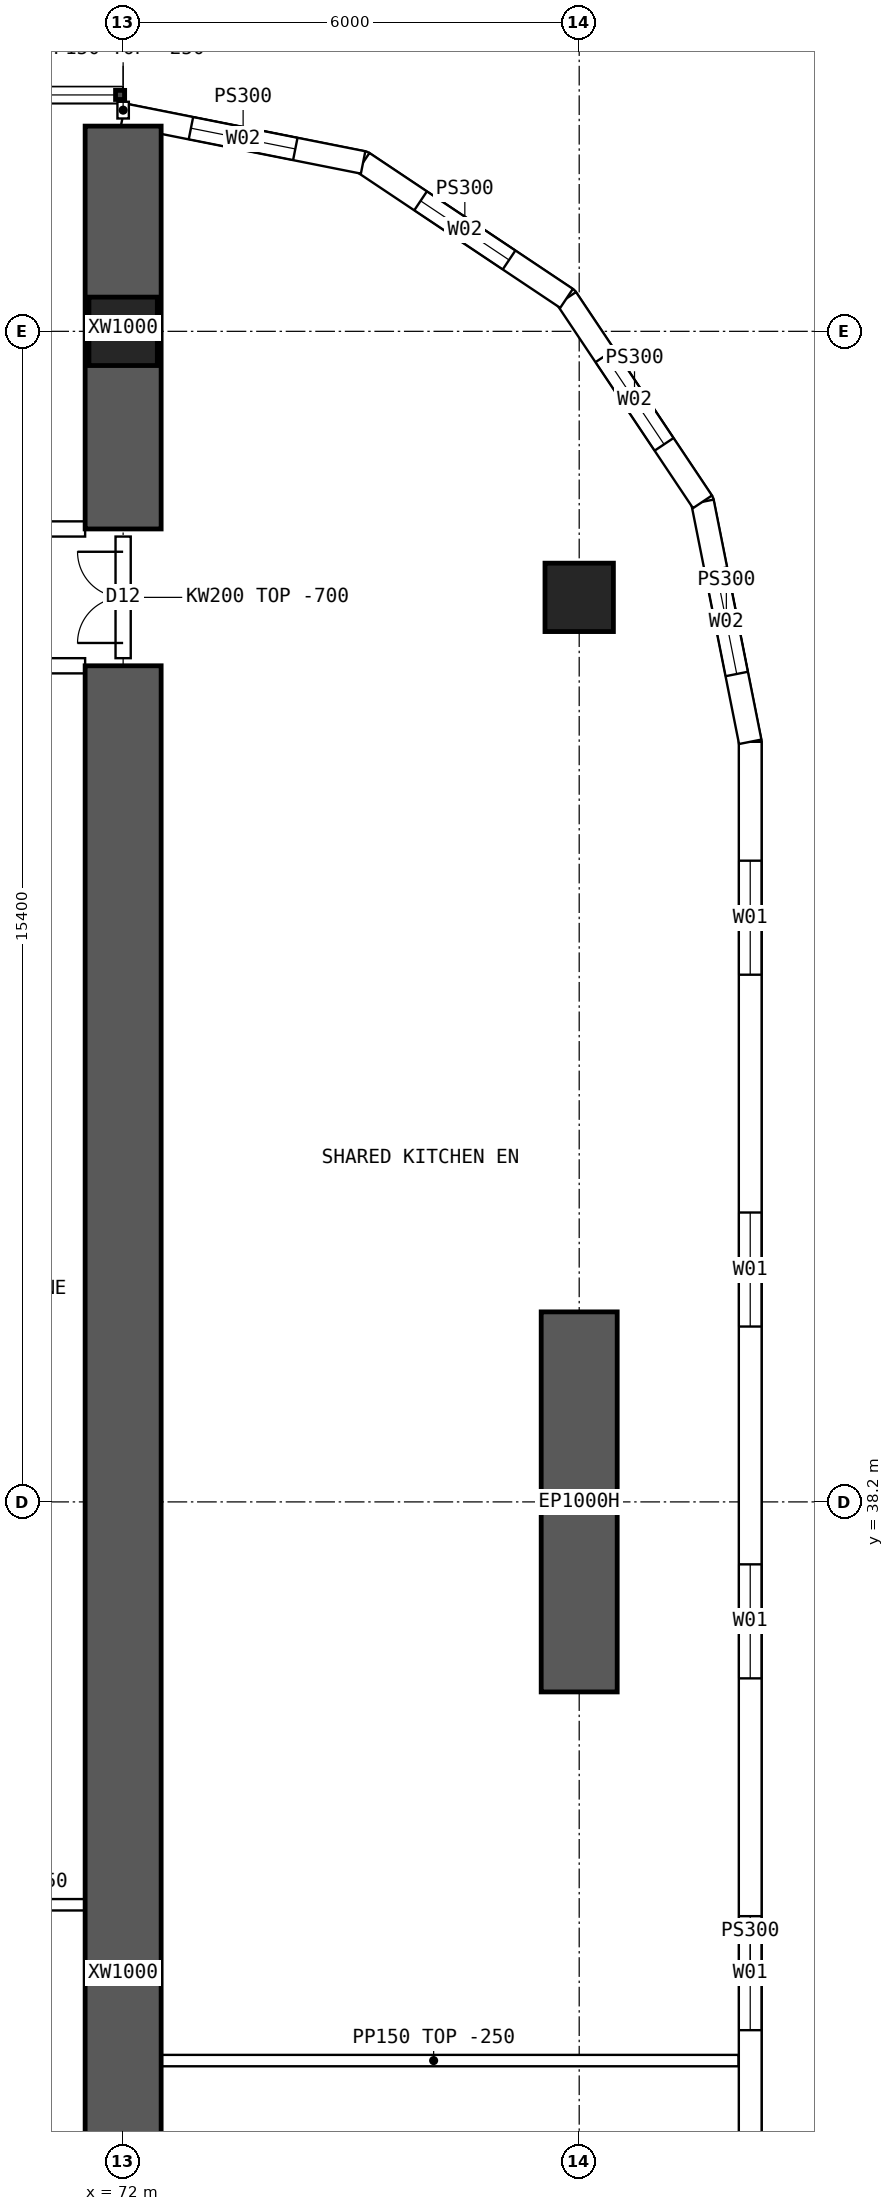
"""IFC4 building model, lengths in metres.
Left out: names, types, materials, properties, quantities, classifications, styles, units other than length and angle.
Written with IfcOpenShell. Run it as: python <this file> out.ifc"""

import sys

from ifc_helpers import new_model, si_unit, direction, frame, frame_2d, origin, origin_2d, place, context, subcontext, project, spatial, polyline, rectangle, hollow_rectangle, outline, extrude, element, fill, save


model = new_model("IFC4")
c1 = context("Model", 3, precision=1e-05, world=origin(), true_north=direction((0.0, 1.0)))
c2 = subcontext(c1, "Body", "Model", "MODEL_VIEW")
j1 = project(units=[si_unit("LENGTHUNIT", "METRE"), si_unit("PLANEANGLEUNIT", "RADIAN")], contexts=[c1])
p1 = place(None, origin())
s1 = spatial("IfcSite", under=j1, at=p1, CompositionType="ELEMENT")
p2 = place(p1, origin())
s2 = spatial("IfcBuilding", under=s1, at=p2, CompositionType="ELEMENT")
p3 = place(p2, frame((0.0, 0.0, 57.7)))
s3 = spatial("IfcBuildingStorey", under=s2, at=p3, CompositionType="ELEMENT", Elevation=57.7)
for number, where, z_axis, x_axis in (
    (1, (72.0, 53.6, 0.0), (0.0, 0.0, 1.0), (1.0, 0.0, 0.0)),
    (2, (78.0, 50.1, 0.0), (0.0, 0.0, 1.0), (1.0, 0.0, 0.0)),
):
    element("IfcColumn", number, at=place(p3, frame(where, z_axis=z_axis, x_axis=x_axis)), inside=s3, PredefinedType="COLUMN", context=c2, shape_type="SweptSolid", body=[
        extrude(hollow_rectangle(XDim=0.9, YDim=0.9, WallThickness=0.09, at=origin_2d()), origin(), (0.0, 0.0, 1.0), 3.75),
    ])
p4 = place(p3, frame((78.0, 35.7, 0.0), z_axis=(0.0, 0.0, 1.0), x_axis=(0.0, 1.0, 0.0)))
e3 = element("IfcWall", 3, at=p4, inside=s3, PredefinedType="SHEAR", context=c2, shape_type="SweptSolid", body=[
    extrude(rectangle(XDim=5.0, YDim=1.0, at=frame_2d((2.5, 0.0))), origin(), (0.0, 0.0, 1.0), 3.75),
])
p5 = place(p3, frame((72.0, 51.0, 0.0), z_axis=(0.0, 0.0, 1.0), x_axis=(0.0, 1.0, 0.0)))
e4 = element("IfcWall", 4, at=p5, inside=s3, PredefinedType="SHEAR", context=c2, shape_type="SweptSolid", body=[
    extrude(rectangle(XDim=5.3, YDim=1.0, at=frame_2d((2.65, 0.0))), origin(), (0.0, 0.0, 1.0), 3.75),
])
p6 = place(p3, frame((72.0, 14.8, 0.0), z_axis=(0.0, 0.0, 1.0), x_axis=(0.0, 1.0, 0.0)))
e5 = element("IfcWall", 5, at=p6, inside=s3, PredefinedType="SHEAR", context=c2, shape_type="SweptSolid", body=[
    extrude(rectangle(XDim=34.4, YDim=1.0, at=frame_2d((17.2, 0.0))), origin(), (0.0, 0.0, 1.0), 3.75),
])
p7 = place(p3, frame((80.25, 15.8, 0.0), z_axis=(0.0, 0.0, 1.0), x_axis=(0.0, 1.0, 0.0)))
e6 = element("IfcWall", 6, at=p7, inside=s3, PredefinedType="SOLIDWALL", context=c2, shape_type="SweptSolid", body=[
    extrude(outline(polyline([(-0.015, -0.15), (32.415, -0.15), (32.385, 0.15), (0.015, 0.15), (-0.015, -0.15)])), origin(), (0.0, 0.0, 1.0), 3.5),
])
p8 = place(p7, frame((1.564, 0.0, 0.9)))
e7 = element("IfcOpeningElement", 7, at=p8, cuts=e6, PredefinedType="OPENING", context=c2, shape_type="SweptSolid", body=[
    extrude(rectangle(XDim=1.5, YDim=2.0, at=frame_2d((0.75, 1.0))), frame((0.0, 0.16, 0.0), z_axis=(0.0, -1.0, 0.0), x_axis=(1.0, 0.0, 0.0)), (0.0, 0.0, 1.0), 0.32),
])
p9 = place(p7, frame((6.193, 0.0, 0.9)))
e8 = element("IfcOpeningElement", 8, at=p9, cuts=e6, PredefinedType="OPENING", context=c2, shape_type="SweptSolid", body=[
    extrude(rectangle(XDim=1.5, YDim=2.0, at=frame_2d((0.75, 1.0))), frame((0.0, 0.16, 0.0), z_axis=(0.0, -1.0, 0.0), x_axis=(1.0, 0.0, 0.0)), (0.0, 0.0, 1.0), 0.32),
])
p10 = place(p7, frame((10.822, 0.0, 0.9)))
e9 = element("IfcOpeningElement", 9, at=p10, cuts=e6, PredefinedType="OPENING", context=c2, shape_type="SweptSolid", body=[
    extrude(rectangle(XDim=1.5, YDim=2.0, at=frame_2d((0.75, 1.0))), frame((0.0, 0.16, 0.0), z_axis=(0.0, -1.0, 0.0), x_axis=(1.0, 0.0, 0.0)), (0.0, 0.0, 1.0), 0.32),
])
p11 = place(p7, frame((15.45, 0.0, 0.9)))
e10 = element("IfcOpeningElement", 10, at=p11, cuts=e6, PredefinedType="OPENING", context=c2, shape_type="SweptSolid", body=[
    extrude(rectangle(XDim=1.5, YDim=2.0, at=frame_2d((0.75, 1.0))), frame((0.0, 0.16, 0.0), z_axis=(0.0, -1.0, 0.0), x_axis=(1.0, 0.0, 0.0)), (0.0, 0.0, 1.0), 0.32),
])
p12 = place(p7, frame((20.079, 0.0, 0.9)))
e11 = element("IfcOpeningElement", 11, at=p12, cuts=e6, PredefinedType="OPENING", context=c2, shape_type="SweptSolid", body=[
    extrude(rectangle(XDim=1.5, YDim=2.0, at=frame_2d((0.75, 1.0))), frame((0.0, 0.16, 0.0), z_axis=(0.0, -1.0, 0.0), x_axis=(1.0, 0.0, 0.0)), (0.0, 0.0, 1.0), 0.32),
])
p13 = place(p7, frame((24.707, 0.0, 0.9)))
e12 = element("IfcOpeningElement", 12, at=p13, cuts=e6, PredefinedType="OPENING", context=c2, shape_type="SweptSolid", body=[
    extrude(rectangle(XDim=1.5, YDim=2.0, at=frame_2d((0.75, 1.0))), frame((0.0, 0.16, 0.0), z_axis=(0.0, -1.0, 0.0), x_axis=(1.0, 0.0, 0.0)), (0.0, 0.0, 1.0), 0.32),
])
p14 = place(p7, frame((29.336, 0.0, 0.9)))
e13 = element("IfcOpeningElement", 13, at=p14, cuts=e6, PredefinedType="OPENING", context=c2, shape_type="SweptSolid", body=[
    extrude(rectangle(XDim=1.5, YDim=2.0, at=frame_2d((0.75, 1.0))), frame((0.0, 0.16, 0.0), z_axis=(0.0, -1.0, 0.0), x_axis=(1.0, 0.0, 0.0)), (0.0, 0.0, 1.0), 0.32),
])
p15 = place(p3, frame((80.25, 48.2, 0.0), z_axis=(0.0, 0.0, 1.0), x_axis=(-0.195065901187, 0.980790137692, 0.0)))
e14 = element("IfcWall", 14, at=p15, inside=s3, PredefinedType="SOLIDWALL", context=c2, shape_type="SweptSolid", body=[
    extrude(outline(polyline([(-0.015, -0.15), (3.249, -0.15), (3.189, 0.15), (0.015, 0.15), (-0.015, -0.15)])), origin(), (0.0, 0.0, 1.0), 3.5),
])
p16 = place(p15, frame((0.909, 0.0, 0.9)))
e15 = element("IfcOpeningElement", 15, at=p16, cuts=e14, PredefinedType="OPENING", context=c2, shape_type="SweptSolid", body=[
    extrude(rectangle(XDim=1.4, YDim=1.8, at=frame_2d((0.7, 0.9))), frame((0.0, 0.16, 0.0), z_axis=(0.0, -1.0, 0.0), x_axis=(1.0, 0.0, 0.0)), (0.0, 0.0, 1.0), 0.32),
])
p17 = place(p3, frame((79.622, 51.357, 0.0), z_axis=(0.0, 0.0, 1.0), x_axis=(-0.555609954424, 0.831443069936, 0.0)))
e16 = element("IfcWall", 16, at=p17, inside=s3, PredefinedType="SOLIDWALL", context=c2, shape_type="SweptSolid", body=[
    extrude(outline(polyline([(-0.03, -0.15), (3.249, -0.15), (3.189, 0.15), (0.03, 0.15), (-0.03, -0.15)])), origin(), (0.0, 0.0, 1.0), 3.5),
])
p18 = place(p17, frame((0.909, 0.0, 0.9)))
e17 = element("IfcOpeningElement", 17, at=p18, cuts=e16, PredefinedType="OPENING", context=c2, shape_type="SweptSolid", body=[
    extrude(rectangle(XDim=1.4, YDim=1.8, at=frame_2d((0.7, 0.9))), frame((0.0, 0.16, 0.0), z_axis=(0.0, -1.0, 0.0), x_axis=(1.0, 0.0, 0.0)), (0.0, 0.0, 1.0), 0.32),
])
p19 = place(p3, frame((77.833, 54.034, 0.0), z_axis=(0.0, 0.0, 1.0), x_axis=(-0.831478105043, 0.555557522525, 0.0)))
e18 = element("IfcWall", 18, at=p19, inside=s3, PredefinedType="SOLIDWALL", context=c2, shape_type="SweptSolid", body=[
    extrude(outline(polyline([(-0.03, -0.15), (3.249, -0.15), (3.189, 0.15), (0.03, 0.15), (-0.03, -0.15)])), origin(), (0.0, 0.0, 1.0), 3.5),
])
p20 = place(p19, frame((0.909, 0.0, 0.9)))
e19 = element("IfcOpeningElement", 19, at=p20, cuts=e18, PredefinedType="OPENING", context=c2, shape_type="SweptSolid", body=[
    extrude(rectangle(XDim=1.4, YDim=1.8, at=frame_2d((0.7, 0.9))), frame((0.0, 0.16, 0.0), z_axis=(0.0, -1.0, 0.0), x_axis=(1.0, 0.0, 0.0)), (0.0, 0.0, 1.0), 0.32),
])
p21 = place(p3, frame((75.157, 55.822, 0.0), z_axis=(0.0, 0.0, 1.0), x_axis=(-0.980787251524, 0.195080412259, 0.0)))
e20 = element("IfcWall", 20, at=p21, inside=s3, PredefinedType="SOLIDWALL", context=c2, shape_type="SweptSolid", body=[
    extrude(outline(polyline([(-0.03, -0.15), (3.249, -0.15), (3.189, 0.15), (0.03, 0.15), (-0.03, -0.15)])), origin(), (0.0, 0.0, 1.0), 3.5),
])
p22 = place(p21, frame((0.909, 0.0, 0.9)))
e21 = element("IfcOpeningElement", 21, at=p22, cuts=e20, PredefinedType="OPENING", context=c2, shape_type="SweptSolid", body=[
    extrude(rectangle(XDim=1.4, YDim=1.8, at=frame_2d((0.7, 0.9))), frame((0.0, 0.16, 0.0), z_axis=(0.0, -1.0, 0.0), x_axis=(1.0, 0.0, 0.0)), (0.0, 0.0, 1.0), 0.32),
])
p23 = place(p3, frame((66.5, 51.0, 0.0), z_axis=(0.0, 0.0, 1.0), x_axis=(1.0, 0.0, 0.0)))
e22 = element("IfcWall", 22, at=p23, inside=s3, PredefinedType="SOLIDWALL", context=c2, shape_type="SweptSolid", body=[
    extrude(outline(polyline([(0.0, 0.0), (5.0, 0.0), (5.0, 3.1), (0.0, 3.1), (0.0, 0.0)])), frame((0.0, 0.1, 0.0), z_axis=(0.0, -1.0, 0.0), x_axis=(1.0, 0.0, 0.0)), (0.0, 0.0, 1.0), 0.2),
])
p24 = place(p23, frame((0.6, 0.0, 0.0)))
e23 = element("IfcOpeningElement", 23, at=p24, cuts=e22, PredefinedType="OPENING", context=c2, shape_type="SweptSolid", body=[
    extrude(rectangle(XDim=1.0, YDim=2.1, at=frame_2d((0.5, 1.05))), frame((0.0, 0.11, 0.0), z_axis=(0.0, -1.0, 0.0), x_axis=(1.0, 0.0, 0.0)), (0.0, 0.0, 1.0), 0.22),
])
p25 = place(p3, frame((66.5, 49.2, 0.0), z_axis=(0.0, 0.0, 1.0), x_axis=(1.0, 0.0, 0.0)))
e24 = element("IfcWall", 24, at=p25, inside=s3, PredefinedType="SOLIDWALL", context=c2, shape_type="SweptSolid", body=[
    extrude(rectangle(XDim=5.0, YDim=0.2, at=frame_2d((2.5, 0.0))), origin(), (0.0, 0.0, 1.0), 3.5),
])
p26 = place(p25, frame((0.2, 0.0, 0.0)))
e25 = element("IfcOpeningElement", 25, at=p26, cuts=e24, PredefinedType="OPENING", context=c2, shape_type="SweptSolid", body=[
    extrude(rectangle(XDim=1.6, YDim=2.1, at=frame_2d((0.8, 1.05))), frame((0.0, 0.11, 0.0), z_axis=(0.0, -1.0, 0.0), x_axis=(1.0, 0.0, 0.0)), (0.0, 0.0, 1.0), 0.22),
])
p27 = place(p3, frame((68.4, 32.9, 0.0), z_axis=(0.0, 0.0, 1.0), x_axis=(1.0, 0.0, 0.0)))
e26 = element("IfcWall", 26, at=p27, inside=s3, PredefinedType="PARTITIONING", context=c2, shape_type="SweptSolid", body=[
    extrude(rectangle(XDim=3.6, YDim=0.15, at=frame_2d((1.8, 0.0))), origin(), (0.0, 0.0, 1.0), 3.5),
])
p28 = place(p3, frame((72.075, 30.85, 0.0), z_axis=(0.0, 0.0, 1.0), x_axis=(1.0, 0.0, 0.0)))
e27 = element("IfcWall", 27, at=p28, inside=s3, PredefinedType="PARTITIONING", context=c2, shape_type="SweptSolid", body=[
    extrude(outline(polyline([(0.0, 0.0), (8.02, 0.0), (8.02, 3.5), (6.227, 3.5), (6.225, 3.05), (5.627, 3.05), (5.625, 3.5), (0.0, 3.5), (0.0, 0.0)])), frame((0.0, 0.075, 0.0), z_axis=(0.0, -1.0, 0.0), x_axis=(1.0, 0.0, 0.0)), (0.0, 0.0, 1.0), 0.15),
])
p29 = place(p3, frame((72.0, 49.3, 0.0), z_axis=(0.0, 0.0, 1.0), x_axis=(0.0, 1.0, 0.0)))
e28 = element("IfcWall", 28, at=p29, inside=s3, PredefinedType="SOLIDWALL", context=c2, shape_type="SweptSolid", body=[
    extrude(outline(polyline([(0.0, 0.0), (1.6, 0.0), (1.6, 3.05), (0.0, 3.05), (0.0, 0.0)])), frame((0.0, 0.1, 0.0), z_axis=(0.0, -1.0, 0.0), x_axis=(1.0, 0.0, 0.0)), (0.0, 0.0, 1.0), 0.2),
])
p30 = place(p29, frame((0.2, 0.0, 0.0)))
e29 = element("IfcOpeningElement", 29, at=p30, cuts=e28, PredefinedType="OPENING", context=c2, shape_type="SweptSolid", body=[
    extrude(rectangle(XDim=1.2, YDim=2.1, at=frame_2d((0.6, 1.05))), frame((0.0, 0.11, 0.0), z_axis=(0.0, -1.0, 0.0), x_axis=(1.0, 0.0, 0.0)), (0.0, 0.0, 1.0), 0.22),
])
p31 = place(p3, frame((72.0, 56.4, 0.0), z_axis=(0.0, 0.0, 1.0), x_axis=(0.0, 1.0, 0.0)))
e30 = element("IfcWall", 30, at=p31, inside=s3, PredefinedType="PARTITIONING", context=c2, shape_type="SweptSolid", body=[
    extrude(rectangle(XDim=0.22, YDim=0.15, at=frame_2d((0.11, 0.0))), origin(), (0.0, 0.0, 1.0), 3.5),
])
p32 = place(p11, origin())
e31 = element("IfcWindow", 31, at=p32, inside=s3, PartitioningType="SINGLE_PANEL", PredefinedType="WINDOW", context=c2, shape_type="SweptSolid", body=[
    extrude(rectangle(XDim=1.5, YDim=2.0, at=frame_2d((0.75, 1.0))), frame((0.0, 0.03, 0.0), z_axis=(0.0, -1.0, 0.0), x_axis=(1.0, 0.0, 0.0)), (0.0, 0.0, 1.0), 0.06),
])
fill(e10, e31)
p33 = place(p12, origin())
e32 = element("IfcWindow", 32, at=p33, inside=s3, PartitioningType="SINGLE_PANEL", PredefinedType="WINDOW", context=c2, shape_type="SweptSolid", body=[
    extrude(rectangle(XDim=1.5, YDim=2.0, at=frame_2d((0.75, 1.0))), frame((0.0, 0.03, 0.0), z_axis=(0.0, -1.0, 0.0), x_axis=(1.0, 0.0, 0.0)), (0.0, 0.0, 1.0), 0.06),
])
fill(e11, e32)
p34 = place(p13, origin())
e33 = element("IfcWindow", 33, at=p34, inside=s3, PartitioningType="SINGLE_PANEL", PredefinedType="WINDOW", context=c2, shape_type="SweptSolid", body=[
    extrude(rectangle(XDim=1.5, YDim=2.0, at=frame_2d((0.75, 1.0))), frame((0.0, 0.03, 0.0), z_axis=(0.0, -1.0, 0.0), x_axis=(1.0, 0.0, 0.0)), (0.0, 0.0, 1.0), 0.06),
])
fill(e12, e33)
p35 = place(p14, origin())
e34 = element("IfcWindow", 34, at=p35, inside=s3, PartitioningType="SINGLE_PANEL", PredefinedType="WINDOW", context=c2, shape_type="SweptSolid", body=[
    extrude(rectangle(XDim=1.5, YDim=2.0, at=frame_2d((0.75, 1.0))), frame((0.0, 0.03, 0.0), z_axis=(0.0, -1.0, 0.0), x_axis=(1.0, 0.0, 0.0)), (0.0, 0.0, 1.0), 0.06),
])
fill(e13, e34)
p36 = place(p16, origin())
e35 = element("IfcWindow", 35, at=p36, inside=s3, PartitioningType="SINGLE_PANEL", PredefinedType="WINDOW", context=c2, shape_type="SweptSolid", body=[
    extrude(rectangle(XDim=1.4, YDim=1.8, at=frame_2d((0.7, 0.9))), frame((0.0, 0.03, 0.0), z_axis=(0.0, -1.0, 0.0), x_axis=(1.0, 0.0, 0.0)), (0.0, 0.0, 1.0), 0.06),
])
fill(e15, e35)
p37 = place(p18, origin())
e36 = element("IfcWindow", 36, at=p37, inside=s3, PartitioningType="SINGLE_PANEL", PredefinedType="WINDOW", context=c2, shape_type="SweptSolid", body=[
    extrude(rectangle(XDim=1.4, YDim=1.8, at=frame_2d((0.7, 0.9))), frame((0.0, 0.03, 0.0), z_axis=(0.0, -1.0, 0.0), x_axis=(1.0, 0.0, 0.0)), (0.0, 0.0, 1.0), 0.06),
])
fill(e17, e36)
p38 = place(p20, origin())
e37 = element("IfcWindow", 37, at=p38, inside=s3, PartitioningType="SINGLE_PANEL", PredefinedType="WINDOW", context=c2, shape_type="SweptSolid", body=[
    extrude(rectangle(XDim=1.4, YDim=1.8, at=frame_2d((0.7, 0.9))), frame((0.0, 0.03, 0.0), z_axis=(0.0, -1.0, 0.0), x_axis=(1.0, 0.0, 0.0)), (0.0, 0.0, 1.0), 0.06),
])
fill(e19, e37)
p39 = place(p22, origin())
e38 = element("IfcWindow", 38, at=p39, inside=s3, PartitioningType="SINGLE_PANEL", PredefinedType="WINDOW", context=c2, shape_type="SweptSolid", body=[
    extrude(rectangle(XDim=1.4, YDim=1.8, at=frame_2d((0.7, 0.9))), frame((0.0, 0.03, 0.0), z_axis=(0.0, -1.0, 0.0), x_axis=(1.0, 0.0, 0.0)), (0.0, 0.0, 1.0), 0.06),
])
fill(e21, e38)
p40 = place(p30, origin())
e39 = element("IfcDoor", 39, at=p40, inside=s3, OperationType="DOUBLE_DOOR_SINGLE_SWING", PredefinedType="DOOR", context=c2, shape_type="SweptSolid", body=[
    extrude(rectangle(XDim=1.2, YDim=2.1, at=frame_2d((0.6, 1.05))), frame((0.0, 0.025, 0.0), z_axis=(0.0, -1.0, 0.0), x_axis=(1.0, 0.0, 0.0)), (0.0, 0.0, 1.0), 0.05),
])
fill(e29, e39)
save(model, sys.argv[1])
